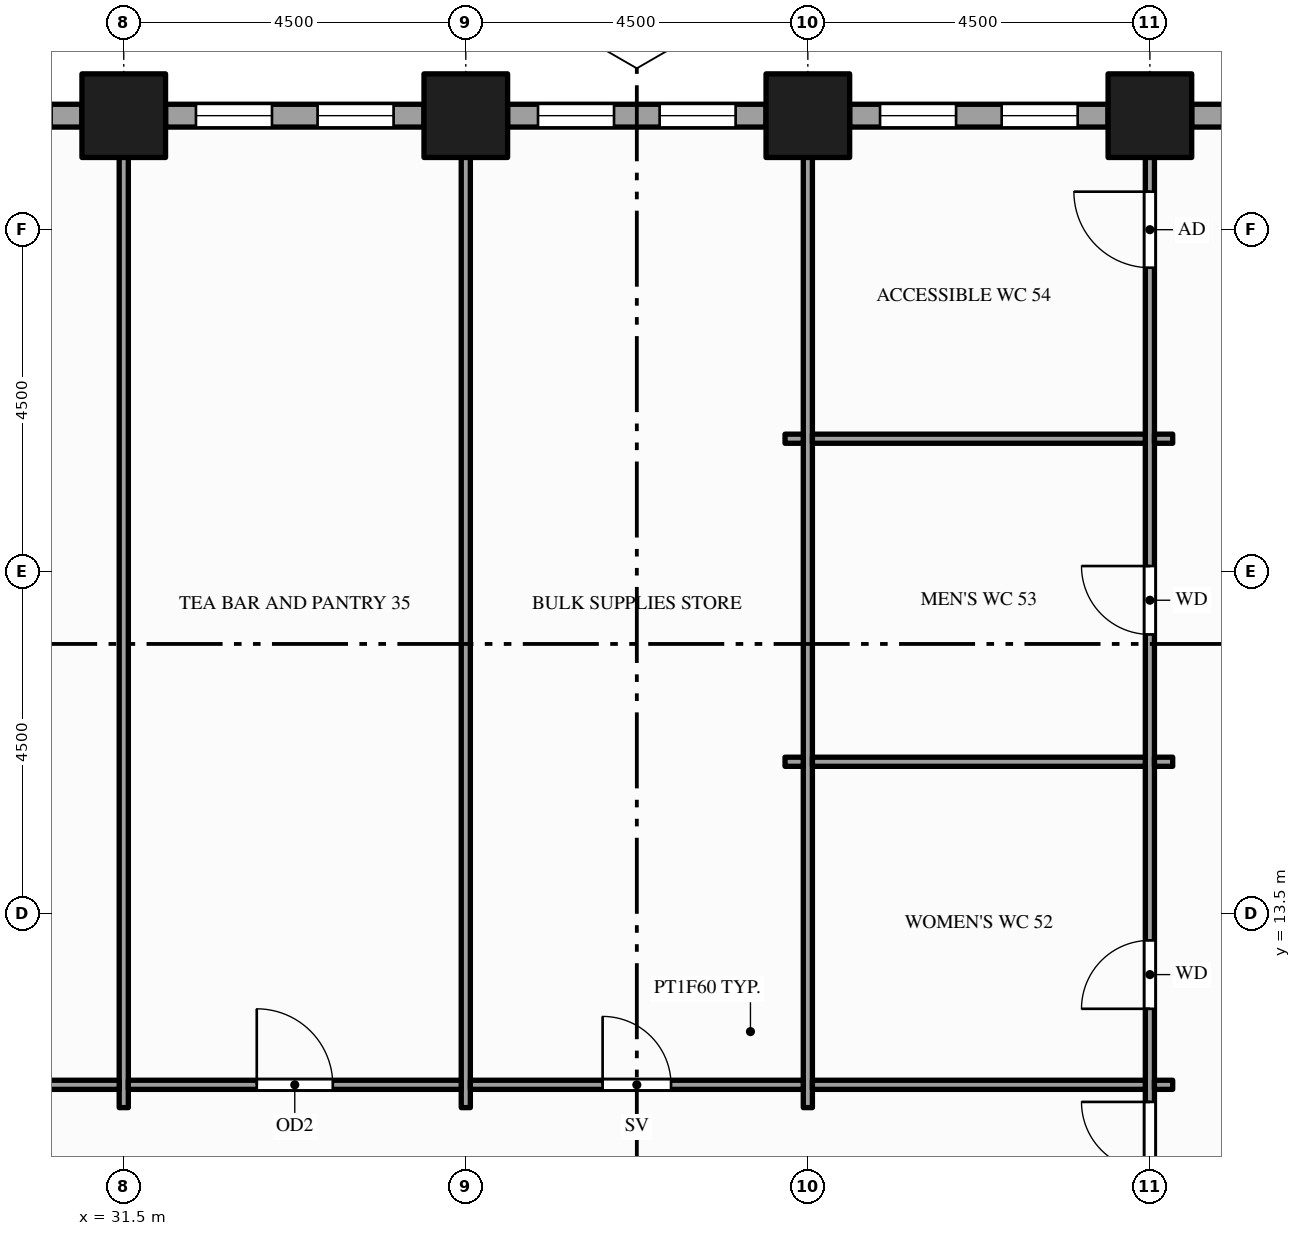
"""IFC4 building model, lengths in metres.
Left out: names, types, materials, properties, quantities, classifications, styles, units other than length and angle.
Written with IfcOpenShell. Run it as: python <this file> out.ifc"""

import sys

from ifc_helpers import new_model, si_unit, direction, frame, frame_2d, origin, origin_2d, place, context, subcontext, project, spatial, rectangle, hollow_rectangle, extrude, element, fill, save


model = new_model("IFC4")
c1 = context("Model", 3, precision=1e-05, world=origin(), true_north=direction((0.0, 1.0)))
c2 = subcontext(c1, "Body", "Model", "MODEL_VIEW")
j1 = project(units=[si_unit("LENGTHUNIT", "METRE"), si_unit("PLANEANGLEUNIT", "RADIAN")], contexts=[c1])
p1 = place(None, origin())
s1 = spatial("IfcSite", under=j1, at=p1, CompositionType="ELEMENT")
p2 = place(p1, origin())
s2 = spatial("IfcBuilding", under=s1, at=p2, CompositionType="ELEMENT")
p3 = place(p2, frame((0.0, 0.0, 61.0)))
s3 = spatial("IfcBuildingStorey", under=s2, at=p3, CompositionType="ELEMENT", Elevation=61.0)
for number, where, z_axis, x_axis in (
    (1, (31.5, 24.0, -0.15), (0.0, 0.0, 1.0), (1.0, 0.0, 0.0)),
    (2, (36.0, 24.0, -0.15), (0.0, 0.0, 1.0), (1.0, 0.0, 0.0)),
    (3, (40.5, 24.0, -0.15), (0.0, 0.0, 1.0), (1.0, 0.0, 0.0)),
    (4, (45.0, 24.0, -0.15), (0.0, 0.0, 1.0), (1.0, 0.0, 0.0)),
):
    element("IfcColumn", number, at=place(p3, frame(where, z_axis=z_axis, x_axis=x_axis)), inside=s3, PredefinedType="COLUMN", context=c2, shape_type="SweptSolid", body=[
        extrude(hollow_rectangle(XDim=1.1, YDim=1.1, WallThickness=0.06, at=origin_2d()), origin(), (0.0, 0.0, 1.0), 4.0),
    ])
p4 = place(p3, frame((48.95, 24.0, 0.0), z_axis=(0.0, 0.0, 1.0), x_axis=(-1.0, 0.0, 0.0)))
e5 = element("IfcWall", 5, at=p4, inside=s3, PredefinedType="STANDARD", context=c2, shape_type="SweptSolid", body=[
    extrude(rectangle(XDim=3.4, YDim=0.3, at=frame_2d((1.7, 0.0))), origin(), (0.0, 0.0, 1.0), 3.144),
])
p5 = place(p4, frame((0.4, 0.0, 0.9)))
e6 = element("IfcOpeningElement", 6, at=p5, cuts=e5, PredefinedType="OPENING", context=c2, shape_type="SweptSolid", body=[
    extrude(rectangle(XDim=1.0, YDim=2.0, at=frame_2d((0.5, 1.0))), frame((0.0, 0.16, 0.0), z_axis=(0.0, -1.0, 0.0), x_axis=(1.0, 0.0, 0.0)), (0.0, 0.0, 1.0), 0.32),
])
p6 = place(p4, frame((2.0, 0.0, 0.9)))
e7 = element("IfcOpeningElement", 7, at=p6, cuts=e5, PredefinedType="OPENING", context=c2, shape_type="SweptSolid", body=[
    extrude(rectangle(XDim=1.0, YDim=2.0, at=frame_2d((0.5, 1.0))), frame((0.0, 0.16, 0.0), z_axis=(0.0, -1.0, 0.0), x_axis=(1.0, 0.0, 0.0)), (0.0, 0.0, 1.0), 0.32),
])
p7 = place(p3, frame((44.45, 24.0, 0.0), z_axis=(0.0, 0.0, 1.0), x_axis=(-1.0, 0.0, 0.0)))
e8 = element("IfcWall", 8, at=p7, inside=s3, PredefinedType="STANDARD", context=c2, shape_type="SweptSolid", body=[
    extrude(rectangle(XDim=3.4, YDim=0.3, at=frame_2d((1.7, 0.0))), origin(), (0.0, 0.0, 1.0), 3.144),
])
p8 = place(p7, frame((0.4, 0.0, 0.9)))
e9 = element("IfcOpeningElement", 9, at=p8, cuts=e8, PredefinedType="OPENING", context=c2, shape_type="SweptSolid", body=[
    extrude(rectangle(XDim=1.0, YDim=2.0, at=frame_2d((0.5, 1.0))), frame((0.0, 0.16, 0.0), z_axis=(0.0, -1.0, 0.0), x_axis=(1.0, 0.0, 0.0)), (0.0, 0.0, 1.0), 0.32),
])
p9 = place(p7, frame((2.0, 0.0, 0.9)))
e10 = element("IfcOpeningElement", 10, at=p9, cuts=e8, PredefinedType="OPENING", context=c2, shape_type="SweptSolid", body=[
    extrude(rectangle(XDim=1.0, YDim=2.0, at=frame_2d((0.5, 1.0))), frame((0.0, 0.16, 0.0), z_axis=(0.0, -1.0, 0.0), x_axis=(1.0, 0.0, 0.0)), (0.0, 0.0, 1.0), 0.32),
])
p10 = place(p3, frame((39.95, 24.0, 0.0), z_axis=(0.0, 0.0, 1.0), x_axis=(-1.0, 0.0, 0.0)))
e11 = element("IfcWall", 11, at=p10, inside=s3, PredefinedType="STANDARD", context=c2, shape_type="SweptSolid", body=[
    extrude(rectangle(XDim=3.4, YDim=0.3, at=frame_2d((1.7, 0.0))), origin(), (0.0, 0.0, 1.0), 3.144),
])
p11 = place(p10, frame((0.4, 0.0, 0.9)))
e12 = element("IfcOpeningElement", 12, at=p11, cuts=e11, PredefinedType="OPENING", context=c2, shape_type="SweptSolid", body=[
    extrude(rectangle(XDim=1.0, YDim=2.0, at=frame_2d((0.5, 1.0))), frame((0.0, 0.16, 0.0), z_axis=(0.0, -1.0, 0.0), x_axis=(1.0, 0.0, 0.0)), (0.0, 0.0, 1.0), 0.32),
])
p12 = place(p10, frame((2.0, 0.0, 0.9)))
e13 = element("IfcOpeningElement", 13, at=p12, cuts=e11, PredefinedType="OPENING", context=c2, shape_type="SweptSolid", body=[
    extrude(rectangle(XDim=1.0, YDim=2.0, at=frame_2d((0.5, 1.0))), frame((0.0, 0.16, 0.0), z_axis=(0.0, -1.0, 0.0), x_axis=(1.0, 0.0, 0.0)), (0.0, 0.0, 1.0), 0.32),
])
p13 = place(p3, frame((35.45, 24.0, 0.0), z_axis=(0.0, 0.0, 1.0), x_axis=(-1.0, 0.0, 0.0)))
e14 = element("IfcWall", 14, at=p13, inside=s3, PredefinedType="STANDARD", context=c2, shape_type="SweptSolid", body=[
    extrude(rectangle(XDim=3.4, YDim=0.3, at=frame_2d((1.7, 0.0))), origin(), (0.0, 0.0, 1.0), 3.144),
])
p14 = place(p13, frame((0.4, 0.0, 0.9)))
e15 = element("IfcOpeningElement", 15, at=p14, cuts=e14, PredefinedType="OPENING", context=c2, shape_type="SweptSolid", body=[
    extrude(rectangle(XDim=1.0, YDim=2.0, at=frame_2d((0.5, 1.0))), frame((0.0, 0.16, 0.0), z_axis=(0.0, -1.0, 0.0), x_axis=(1.0, 0.0, 0.0)), (0.0, 0.0, 1.0), 0.32),
])
p15 = place(p13, frame((2.0, 0.0, 0.9)))
e16 = element("IfcOpeningElement", 16, at=p15, cuts=e14, PredefinedType="OPENING", context=c2, shape_type="SweptSolid", body=[
    extrude(rectangle(XDim=1.0, YDim=2.0, at=frame_2d((0.5, 1.0))), frame((0.0, 0.16, 0.0), z_axis=(0.0, -1.0, 0.0), x_axis=(1.0, 0.0, 0.0)), (0.0, 0.0, 1.0), 0.32),
])
p16 = place(p3, frame((30.95, 24.0, 0.0), z_axis=(0.0, 0.0, 1.0), x_axis=(-1.0, 0.0, 0.0)))
e17 = element("IfcWall", 17, at=p16, inside=s3, PredefinedType="STANDARD", context=c2, shape_type="SweptSolid", body=[
    extrude(rectangle(XDim=4.9, YDim=0.3, at=frame_2d((2.45, 0.0))), origin(), (0.0, 0.0, 1.0), 3.144),
])
p17 = place(p16, frame((0.4, 0.0, 0.9)))
e18 = element("IfcOpeningElement", 18, at=p17, cuts=e17, PredefinedType="OPENING", context=c2, shape_type="SweptSolid", body=[
    extrude(rectangle(XDim=1.0, YDim=2.0, at=frame_2d((0.5, 1.0))), frame((0.0, 0.16, 0.0), z_axis=(0.0, -1.0, 0.0), x_axis=(1.0, 0.0, 0.0)), (0.0, 0.0, 1.0), 0.32),
])
p18 = place(p16, frame((2.0, 0.0, 0.9)))
e19 = element("IfcOpeningElement", 19, at=p18, cuts=e17, PredefinedType="OPENING", context=c2, shape_type="SweptSolid", body=[
    extrude(rectangle(XDim=1.65, YDim=2.0, at=frame_2d((0.825, 1.0))), frame((0.0, 0.16, 0.0), z_axis=(0.0, -1.0, 0.0), x_axis=(1.0, 0.0, 0.0)), (0.0, 0.0, 1.0), 0.32),
])
for number, where, z_axis, x_axis in (
    (20, (31.5, 10.95, 0.0), (0.0, 0.0, 1.0), (0.0, 1.0, 0.0)),
    (21, (36.0, 10.95, 0.0), (0.0, 0.0, 1.0), (0.0, 1.0, 0.0)),
    (22, (40.5, 10.95, 0.0), (0.0, 0.0, 1.0), (0.0, 1.0, 0.0)),
):
    element("IfcWall", number, at=place(p3, frame(where, z_axis=z_axis, x_axis=x_axis)), inside=s3, PredefinedType="PARTITIONING", context=c2, shape_type="SweptSolid", body=[
        extrude(rectangle(XDim=12.9, YDim=0.12, at=frame_2d((6.45, 0.0))), origin(), (0.0, 0.0, 1.0), 2.938),
    ])
p19 = place(p3, frame((45.0, 1.65, 0.0), z_axis=(0.0, 0.0, 1.0), x_axis=(0.0, 1.0, 0.0)))
e23 = element("IfcWall", 23, at=p19, inside=s3, PredefinedType="PARTITIONING", context=c2, shape_type="SweptSolid", body=[
    extrude(rectangle(XDim=22.2, YDim=0.12, at=frame_2d((11.1, 0.0))), origin(), (0.0, 0.0, 1.0), 2.938),
])
p20 = place(p19, frame((7.575, 0.0, 0.0)))
e24 = element("IfcOpeningElement", 24, at=p20, cuts=e23, PredefinedType="OPENING", context=c2, shape_type="SweptSolid", body=[
    extrude(rectangle(XDim=1.8, YDim=2.1, at=frame_2d((0.9, 1.05))), frame((0.0, 0.07, 0.0), z_axis=(0.0, -1.0, 0.0), x_axis=(1.0, 0.0, 0.0)), (0.0, 0.0, 1.0), 0.14),
])
p21 = place(p19, frame((10.6, 0.0, 0.0)))
e25 = element("IfcOpeningElement", 25, at=p21, cuts=e23, PredefinedType="OPENING", context=c2, shape_type="SweptSolid", body=[
    extrude(rectangle(XDim=0.9, YDim=2.1, at=frame_2d((0.45, 1.05))), frame((0.0, 0.07, 0.0), z_axis=(0.0, -1.0, 0.0), x_axis=(1.0, 0.0, 0.0)), (0.0, 0.0, 1.0), 0.14),
])
p22 = place(p19, frame((15.525, 0.0, 0.0)))
e26 = element("IfcOpeningElement", 26, at=p22, cuts=e23, PredefinedType="OPENING", context=c2, shape_type="SweptSolid", body=[
    extrude(rectangle(XDim=0.9, YDim=2.1, at=frame_2d((0.45, 1.05))), frame((0.0, 0.07, 0.0), z_axis=(0.0, -1.0, 0.0), x_axis=(1.0, 0.0, 0.0)), (0.0, 0.0, 1.0), 0.14),
])
p23 = place(p19, frame((20.35, 0.0, 0.0)))
e27 = element("IfcOpeningElement", 27, at=p23, cuts=e23, PredefinedType="OPENING", context=c2, shape_type="SweptSolid", body=[
    extrude(rectangle(XDim=1.0, YDim=2.1, at=frame_2d((0.5, 1.05))), frame((0.0, 0.07, 0.0), z_axis=(0.0, -1.0, 0.0), x_axis=(1.0, 0.0, 0.0)), (0.0, 0.0, 1.0), 0.14),
])
p24 = place(p3, frame((15.81, 11.25, 0.0), z_axis=(0.0, 0.0, 1.0), x_axis=(1.0, 0.0, 0.0)))
e28 = element("IfcWall", 28, at=p24, inside=s3, PredefinedType="PARTITIONING", context=c2, shape_type="SweptSolid", body=[
    extrude(rectangle(XDim=15.63, YDim=0.12, at=frame_2d((7.815, 0.0))), origin(), (0.0, 0.0, 1.0), 2.938),
])
p25 = place(p24, frame((3.54, 0.0, 0.0)))
e29 = element("IfcOpeningElement", 29, at=p25, cuts=e28, PredefinedType="OPENING", context=c2, shape_type="SweptSolid", body=[
    extrude(rectangle(XDim=1.8, YDim=2.1, at=frame_2d((0.9, 1.05))), frame((0.0, 0.07, 0.0), z_axis=(0.0, -1.0, 0.0), x_axis=(1.0, 0.0, 0.0)), (0.0, 0.0, 1.0), 0.14),
])
p26 = place(p3, frame((31.56, 11.25, 0.0), z_axis=(0.0, 0.0, 1.0), x_axis=(1.0, 0.0, 0.0)))
e30 = element("IfcWall", 30, at=p26, inside=s3, PredefinedType="PARTITIONING", context=c2, shape_type="SweptSolid", body=[
    extrude(rectangle(XDim=4.38, YDim=0.12, at=frame_2d((2.19, 0.0))), origin(), (0.0, 0.0, 1.0), 2.938),
])
p27 = place(p26, frame((1.69, 0.0, 0.0)))
e31 = element("IfcOpeningElement", 31, at=p27, cuts=e30, PredefinedType="OPENING", context=c2, shape_type="SweptSolid", body=[
    extrude(rectangle(XDim=1.0, YDim=2.1, at=frame_2d((0.5, 1.05))), frame((0.0, 0.07, 0.0), z_axis=(0.0, -1.0, 0.0), x_axis=(1.0, 0.0, 0.0)), (0.0, 0.0, 1.0), 0.14),
])
p28 = place(p3, frame((36.06, 11.25, 0.0), z_axis=(0.0, 0.0, 1.0), x_axis=(1.0, 0.0, 0.0)))
e32 = element("IfcWall", 32, at=p28, inside=s3, PredefinedType="PARTITIONING", context=c2, shape_type="SweptSolid", body=[
    extrude(rectangle(XDim=4.38, YDim=0.12, at=frame_2d((2.19, 0.0))), origin(), (0.0, 0.0, 1.0), 2.938),
])
p29 = place(p28, frame((1.74, 0.0, 0.0)))
e33 = element("IfcOpeningElement", 33, at=p29, cuts=e32, PredefinedType="OPENING", context=c2, shape_type="SweptSolid", body=[
    extrude(rectangle(XDim=0.9, YDim=2.1, at=frame_2d((0.45, 1.05))), frame((0.0, 0.07, 0.0), z_axis=(0.0, -1.0, 0.0), x_axis=(1.0, 0.0, 0.0)), (0.0, 0.0, 1.0), 0.14),
])
p30 = place(p3, frame((40.56, 11.25, 0.0), z_axis=(0.0, 0.0, 1.0), x_axis=(1.0, 0.0, 0.0)))
e34 = element("IfcWall", 34, at=p30, inside=s3, PredefinedType="PARTITIONING", context=c2, shape_type="SweptSolid", body=[
    extrude(rectangle(XDim=4.38, YDim=0.12, at=frame_2d((2.19, 0.0))), origin(), (0.0, 0.0, 1.0), 2.938),
])
for number, where, z_axis, x_axis in (
    (35, (45.06, 11.25, 0.0), (0.0, 0.0, 1.0), (1.0, 0.0, 0.0)),
    (36, (40.2, 15.5, 0.0), (0.0, 0.0, 1.0), (1.0, 0.0, 0.0)),
):
    element("IfcWall", number, at=place(p3, frame(where, z_axis=z_axis, x_axis=x_axis)), inside=s3, PredefinedType="PARTITIONING", context=c2, shape_type="SweptSolid", body=[
        extrude(rectangle(XDim=0.24, YDim=0.12, at=frame_2d((0.12, 0.0))), origin(), (0.0, 0.0, 1.0), 2.938),
    ])
p31 = place(p3, frame((40.56, 15.5, 0.0), z_axis=(0.0, 0.0, 1.0), x_axis=(1.0, 0.0, 0.0)))
e37 = element("IfcWall", 37, at=p31, inside=s3, PredefinedType="PARTITIONING", context=c2, shape_type="SweptSolid", body=[
    extrude(rectangle(XDim=4.38, YDim=0.12, at=frame_2d((2.19, 0.0))), origin(), (0.0, 0.0, 1.0), 2.938),
])
for number, where, z_axis, x_axis in (
    (38, (45.06, 15.5, 0.0), (0.0, 0.0, 1.0), (1.0, 0.0, 0.0)),
    (39, (40.2, 19.75, 0.0), (0.0, 0.0, 1.0), (1.0, 0.0, 0.0)),
):
    element("IfcWall", number, at=place(p3, frame(where, z_axis=z_axis, x_axis=x_axis)), inside=s3, PredefinedType="PARTITIONING", context=c2, shape_type="SweptSolid", body=[
        extrude(rectangle(XDim=0.24, YDim=0.12, at=frame_2d((0.12, 0.0))), origin(), (0.0, 0.0, 1.0), 2.938),
    ])
p32 = place(p3, frame((40.56, 19.75, 0.0), z_axis=(0.0, 0.0, 1.0), x_axis=(1.0, 0.0, 0.0)))
e40 = element("IfcWall", 40, at=p32, inside=s3, PredefinedType="PARTITIONING", context=c2, shape_type="SweptSolid", body=[
    extrude(rectangle(XDim=4.38, YDim=0.12, at=frame_2d((2.19, 0.0))), origin(), (0.0, 0.0, 1.0), 2.938),
])
p33 = place(p3, frame((45.06, 19.75, 0.0), z_axis=(0.0, 0.0, 1.0), x_axis=(1.0, 0.0, 0.0)))
e41 = element("IfcWall", 41, at=p33, inside=s3, PredefinedType="PARTITIONING", context=c2, shape_type="SweptSolid", body=[
    extrude(rectangle(XDim=0.24, YDim=0.12, at=frame_2d((0.12, 0.0))), origin(), (0.0, 0.0, 1.0), 2.938),
])
p34 = place(p8, origin())
e42 = element("IfcWindow", 42, at=p34, inside=s3, PartitioningType="SINGLE_PANEL", PredefinedType="WINDOW", context=c2, shape_type="SweptSolid", body=[
    extrude(rectangle(XDim=1.0, YDim=2.0, at=frame_2d((0.5, 1.0))), frame((0.0, 0.03, 0.0), z_axis=(0.0, -1.0, 0.0), x_axis=(1.0, 0.0, 0.0)), (0.0, 0.0, 1.0), 0.06),
])
fill(e9, e42)
p35 = place(p9, origin())
e43 = element("IfcWindow", 43, at=p35, inside=s3, PartitioningType="SINGLE_PANEL", PredefinedType="WINDOW", context=c2, shape_type="SweptSolid", body=[
    extrude(rectangle(XDim=1.0, YDim=2.0, at=frame_2d((0.5, 1.0))), frame((0.0, 0.03, 0.0), z_axis=(0.0, -1.0, 0.0), x_axis=(1.0, 0.0, 0.0)), (0.0, 0.0, 1.0), 0.06),
])
fill(e10, e43)
p36 = place(p11, origin())
e44 = element("IfcWindow", 44, at=p36, inside=s3, PartitioningType="SINGLE_PANEL", PredefinedType="WINDOW", context=c2, shape_type="SweptSolid", body=[
    extrude(rectangle(XDim=1.0, YDim=2.0, at=frame_2d((0.5, 1.0))), frame((0.0, 0.03, 0.0), z_axis=(0.0, -1.0, 0.0), x_axis=(1.0, 0.0, 0.0)), (0.0, 0.0, 1.0), 0.06),
])
fill(e12, e44)
p37 = place(p12, origin())
e45 = element("IfcWindow", 45, at=p37, inside=s3, PartitioningType="SINGLE_PANEL", PredefinedType="WINDOW", context=c2, shape_type="SweptSolid", body=[
    extrude(rectangle(XDim=1.0, YDim=2.0, at=frame_2d((0.5, 1.0))), frame((0.0, 0.03, 0.0), z_axis=(0.0, -1.0, 0.0), x_axis=(1.0, 0.0, 0.0)), (0.0, 0.0, 1.0), 0.06),
])
fill(e13, e45)
p38 = place(p14, origin())
e46 = element("IfcWindow", 46, at=p38, inside=s3, PartitioningType="SINGLE_PANEL", PredefinedType="WINDOW", context=c2, shape_type="SweptSolid", body=[
    extrude(rectangle(XDim=1.0, YDim=2.0, at=frame_2d((0.5, 1.0))), frame((0.0, 0.03, 0.0), z_axis=(0.0, -1.0, 0.0), x_axis=(1.0, 0.0, 0.0)), (0.0, 0.0, 1.0), 0.06),
])
fill(e15, e46)
p39 = place(p15, origin())
e47 = element("IfcWindow", 47, at=p39, inside=s3, PartitioningType="SINGLE_PANEL", PredefinedType="WINDOW", context=c2, shape_type="SweptSolid", body=[
    extrude(rectangle(XDim=1.0, YDim=2.0, at=frame_2d((0.5, 1.0))), frame((0.0, 0.03, 0.0), z_axis=(0.0, -1.0, 0.0), x_axis=(1.0, 0.0, 0.0)), (0.0, 0.0, 1.0), 0.06),
])
fill(e16, e47)
p40 = place(p20, origin())
e48 = element("IfcDoor", 48, at=p40, inside=s3, OperationType="DOUBLE_DOOR_SINGLE_SWING", PredefinedType="DOOR", context=c2, shape_type="SweptSolid", body=[
    extrude(rectangle(XDim=1.8, YDim=2.1, at=frame_2d((0.9, 1.05))), frame((0.0, 0.025, 0.0), z_axis=(0.0, -1.0, 0.0), x_axis=(1.0, 0.0, 0.0)), (0.0, 0.0, 1.0), 0.05),
])
fill(e24, e48)
p41 = place(p27, origin())
e49 = element("IfcDoor", 49, at=p41, inside=s3, OperationType="SINGLE_SWING_LEFT", PredefinedType="DOOR", context=c2, shape_type="SweptSolid", body=[
    extrude(rectangle(XDim=1.0, YDim=2.1, at=frame_2d((0.5, 1.05))), frame((0.0, 0.025, 0.0), z_axis=(0.0, -1.0, 0.0), x_axis=(1.0, 0.0, 0.0)), (0.0, 0.0, 1.0), 0.05),
])
fill(e31, e49)
p42 = place(p29, origin())
e50 = element("IfcDoor", 50, at=p42, inside=s3, OperationType="SINGLE_SWING_LEFT", PredefinedType="DOOR", context=c2, shape_type="SweptSolid", body=[
    extrude(rectangle(XDim=0.9, YDim=2.1, at=frame_2d((0.45, 1.05))), frame((0.0, 0.025, 0.0), z_axis=(0.0, -1.0, 0.0), x_axis=(1.0, 0.0, 0.0)), (0.0, 0.0, 1.0), 0.05),
])
fill(e33, e50)
p43 = place(p21, origin())
e51 = element("IfcDoor", 51, at=p43, inside=s3, OperationType="SINGLE_SWING_LEFT", PredefinedType="DOOR", context=c2, shape_type="SweptSolid", body=[
    extrude(rectangle(XDim=0.9, YDim=2.1, at=frame_2d((0.45, 1.05))), frame((0.0, 0.025, 0.0), z_axis=(0.0, -1.0, 0.0), x_axis=(1.0, 0.0, 0.0)), (0.0, 0.0, 1.0), 0.05),
])
fill(e25, e51)
p44 = place(p22, origin())
e52 = element("IfcDoor", 52, at=p44, inside=s3, OperationType="SINGLE_SWING_RIGHT", PredefinedType="DOOR", context=c2, shape_type="SweptSolid", body=[
    extrude(rectangle(XDim=0.9, YDim=2.1, at=frame_2d((0.45, 1.05))), frame((0.0, 0.025, 0.0), z_axis=(0.0, -1.0, 0.0), x_axis=(1.0, 0.0, 0.0)), (0.0, 0.0, 1.0), 0.05),
])
fill(e26, e52)
p45 = place(p23, origin())
e53 = element("IfcDoor", 53, at=p45, inside=s3, OperationType="SINGLE_SWING_RIGHT", PredefinedType="DOOR", context=c2, shape_type="SweptSolid", body=[
    extrude(rectangle(XDim=1.0, YDim=2.1, at=frame_2d((0.5, 1.05))), frame((0.0, 0.025, 0.0), z_axis=(0.0, -1.0, 0.0), x_axis=(1.0, 0.0, 0.0)), (0.0, 0.0, 1.0), 0.05),
])
fill(e27, e53)
save(model, sys.argv[1])
